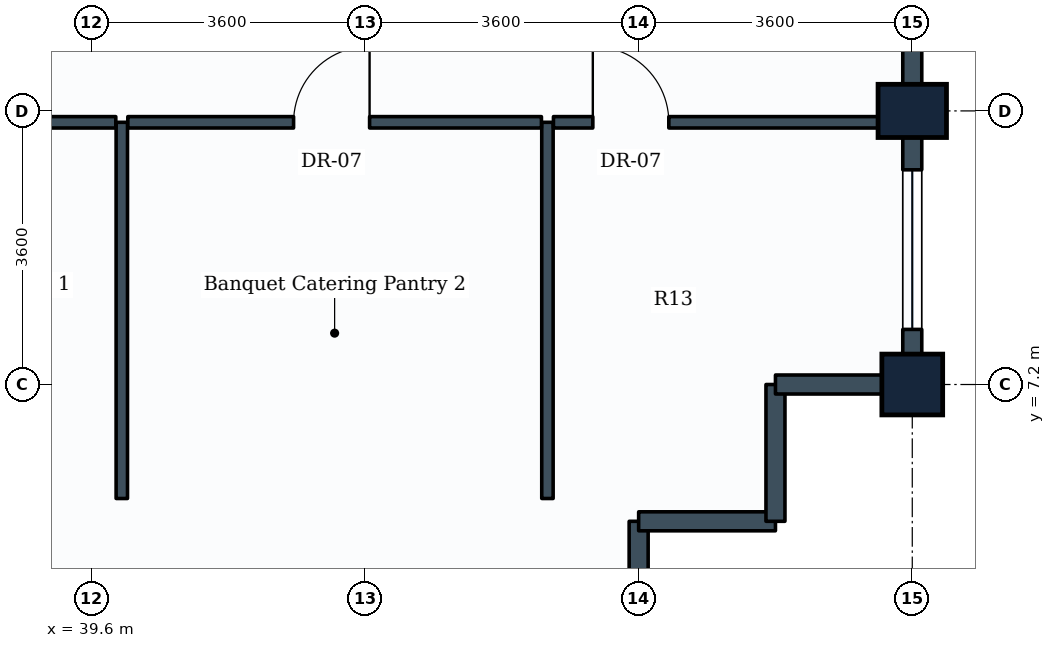
"""IFC4 building model, lengths in metres.
Left out: names, types, materials, properties, quantities, classifications, styles, units other than length and angle.
Written with IfcOpenShell. Run it as: python <this file> out.ifc"""

import sys

from ifc_helpers import new_model, si_unit, direction, frame, frame_2d, origin, origin_2d, place, context, subcontext, project, spatial, rectangle, extrude, element, fill, save


model = new_model("IFC4")
c1 = context("Model", 3, precision=1e-05, world=origin(), true_north=direction((0.0, 1.0)))
c2 = subcontext(c1, "Body", "Model", "MODEL_VIEW")
j1 = project(units=[si_unit("LENGTHUNIT", "METRE"), si_unit("PLANEANGLEUNIT", "RADIAN")], contexts=[c1])
p1 = place(None, origin())
s1 = spatial("IfcSite", under=j1, at=p1, CompositionType="ELEMENT")
p2 = place(p1, origin())
s2 = spatial("IfcBuilding", under=s1, at=p2, CompositionType="ELEMENT")
p3 = place(p2, frame((0.0, 0.0, 201.4)))
s3 = spatial("IfcBuildingStorey", under=s2, at=p3, CompositionType="ELEMENT", Elevation=201.4)
p4 = place(p3, frame((50.4, 7.2, 0.0), z_axis=(0.0, 0.0, 1.0), x_axis=(1.0, 0.0, 0.0)))
e1 = element("IfcColumn", 1, at=p4, inside=s3, PredefinedType="COLUMN", context=c2, shape_type="SweptSolid", body=[
    extrude(rectangle(XDim=0.8, YDim=0.8, at=origin_2d()), origin(), (0.0, 0.0, 1.0), 3.8),
])
p5 = place(p3, frame((50.4, 10.8, 0.0), z_axis=(0.0, 0.0, 1.0), x_axis=(0.0, 1.0, 0.0)))
e2 = element("IfcColumn", 2, at=p5, inside=s3, PredefinedType="COLUMN", context=c2, shape_type="SweptSolid", body=[
    extrude(rectangle(XDim=0.7, YDim=0.9, at=origin_2d()), origin(), (0.0, 0.0, 1.0), 3.8),
])
p6 = place(p3, frame((46.8, 5.4, 0.0), z_axis=(0.0, 0.0, 1.0), x_axis=(0.0, -1.0, 0.0)))
e3 = element("IfcWall", 3, at=p6, inside=s3, PredefinedType="STANDARD", context=c2, shape_type="SweptSolid", body=[
    extrude(rectangle(XDim=1.8, YDim=0.25, at=frame_2d((0.9, 0.0))), origin(), (0.0, 0.0, 1.0), 2.93),
])
for number, where, z_axis, x_axis in (
    (4, (48.6, 5.4, 0.0), (0.0, 0.0, 1.0), (-1.0, 0.0, 0.0)),
    (5, (48.6, 7.2, 0.0), (0.0, 0.0, 1.0), (0.0, -1.0, 0.0)),
):
    element("IfcWall", number, at=place(p3, frame(where, z_axis=z_axis, x_axis=x_axis)), inside=s3, PredefinedType="STANDARD", context=c2, shape_type="SweptSolid", body=[
        extrude(rectangle(XDim=1.8, YDim=0.25, at=frame_2d((0.9, 0.0))), origin(), (0.0, 0.0, 1.0), 3.535),
    ])
p7 = place(p3, frame((50.4, 7.2, 0.0), z_axis=(0.0, 0.0, 1.0), x_axis=(-1.0, 0.0, 0.0)))
e6 = element("IfcWall", 6, at=p7, inside=s3, PredefinedType="STANDARD", context=c2, shape_type="SweptSolid", body=[
    extrude(rectangle(XDim=1.8, YDim=0.25, at=frame_2d((0.9, 0.0))), origin(), (0.0, 0.0, 1.0), 2.93),
])
p8 = place(p3, frame((50.4, 10.8, 0.0), z_axis=(0.0, 0.0, 1.0), x_axis=(0.0, -1.0, 0.0)))
e7 = element("IfcWall", 7, at=p8, inside=s3, PredefinedType="STANDARD", context=c2, shape_type="SweptSolid", body=[
    extrude(rectangle(XDim=3.6, YDim=0.25, at=frame_2d((1.8, 0.0))), origin(), (0.0, 0.0, 1.0), 2.93),
])
p9 = place(p8, frame((0.775, 0.0, 0.85)))
e8 = element("IfcOpeningElement", 8, at=p9, cuts=e7, PredefinedType="OPENING", context=c2, shape_type="SweptSolid", body=[
    extrude(rectangle(XDim=2.1, YDim=1.35, at=frame_2d((1.05, 0.675))), frame((0.0, 0.135, 0.0), z_axis=(0.0, -1.0, 0.0), x_axis=(1.0, 0.0, 0.0)), (0.0, 0.0, 1.0), 0.27),
])
p10 = place(p3, frame((50.4, 14.4, 0.0), z_axis=(0.0, 0.0, 1.0), x_axis=(0.0, -1.0, 0.0)))
e9 = element("IfcWall", 9, at=p10, inside=s3, PredefinedType="STANDARD", context=c2, shape_type="SweptSolid", body=[
    extrude(rectangle(XDim=3.6, YDim=0.25, at=frame_2d((1.8, 0.0))), origin(), (0.0, 0.0, 1.0), 2.93),
])
p11 = place(p3, frame((40.0, 5.7, 0.0), z_axis=(0.0, 0.0, 1.0), x_axis=(0.0, 1.0, 0.0)))
e10 = element("IfcWall", 10, at=p11, inside=s3, PredefinedType="PARTITIONING", context=c2, shape_type="SweptSolid", body=[
    extrude(rectangle(XDim=4.95, YDim=0.15, at=frame_2d((2.475, 0.0))), origin(), (0.0, 0.0, 1.0), 3.2),
])
p12 = place(p3, frame((34.479, 10.65, 0.0), z_axis=(0.0, 0.0, 1.0), x_axis=(1.0, 0.0, 0.0)))
e11 = element("IfcWall", 11, at=p12, inside=s3, PredefinedType="PARTITIONING", context=c2, shape_type="SweptSolid", body=[
    extrude(rectangle(XDim=5.442, YDim=0.15, at=frame_2d((2.721, 0.0))), origin(), (0.0, 0.0, 1.0), 3.17),
])
p13 = place(p12, frame((2.181, 0.0, 0.0)))
e12 = element("IfcOpeningElement", 12, at=p13, cuts=e11, PredefinedType="OPENING", context=c2, shape_type="SweptSolid", body=[
    extrude(rectangle(XDim=1.0, YDim=2.1, at=frame_2d((0.5, 1.05))), frame((0.0, 0.085, 0.0), z_axis=(0.0, -1.0, 0.0), x_axis=(1.0, 0.0, 0.0)), (0.0, 0.0, 1.0), 0.17),
])
p14 = place(p3, frame((45.6, 5.7, 0.0), z_axis=(0.0, 0.0, 1.0), x_axis=(0.0, 1.0, 0.0)))
e13 = element("IfcWall", 13, at=p14, inside=s3, PredefinedType="PARTITIONING", context=c2, shape_type="SweptSolid", body=[
    extrude(rectangle(XDim=4.95, YDim=0.15, at=frame_2d((2.475, 0.0))), origin(), (0.0, 0.0, 1.0), 3.535),
])
p15 = place(p3, frame((40.079, 10.65, 0.0), z_axis=(0.0, 0.0, 1.0), x_axis=(1.0, 0.0, 0.0)))
e14 = element("IfcWall", 14, at=p15, inside=s3, PredefinedType="PARTITIONING", context=c2, shape_type="SweptSolid", body=[
    extrude(rectangle(XDim=5.442, YDim=0.15, at=frame_2d((2.721, 0.0))), origin(), (0.0, 0.0, 1.0), 3.17),
])
p16 = place(p15, frame((2.181, 0.0, 0.0)))
e15 = element("IfcOpeningElement", 15, at=p16, cuts=e14, PredefinedType="OPENING", context=c2, shape_type="SweptSolid", body=[
    extrude(rectangle(XDim=1.0, YDim=2.1, at=frame_2d((0.5, 1.05))), frame((0.0, 0.085, 0.0), z_axis=(0.0, -1.0, 0.0), x_axis=(1.0, 0.0, 0.0)), (0.0, 0.0, 1.0), 0.17),
])
p17 = place(p3, frame((45.679, 10.65, 0.0), z_axis=(0.0, 0.0, 1.0), x_axis=(1.0, 0.0, 0.0)))
e16 = element("IfcWall", 16, at=p17, inside=s3, PredefinedType="PARTITIONING", context=c2, shape_type="SweptSolid", body=[
    extrude(rectangle(XDim=4.592, YDim=0.15, at=frame_2d((2.296, 0.0))), origin(), (0.0, 0.0, 1.0), 2.93),
])
p18 = place(p17, frame((0.518, 0.0, 0.0)))
e17 = element("IfcOpeningElement", 17, at=p18, cuts=e16, PredefinedType="OPENING", context=c2, shape_type="SweptSolid", body=[
    extrude(rectangle(XDim=1.0, YDim=2.1, at=frame_2d((0.5, 1.05))), frame((0.0, 0.085, 0.0), z_axis=(0.0, -1.0, 0.0), x_axis=(1.0, 0.0, 0.0)), (0.0, 0.0, 1.0), 0.17),
])
p19 = place(p9, origin())
e18 = element("IfcWindow", 18, at=p19, inside=s3, PartitioningType="SINGLE_PANEL", PredefinedType="WINDOW", context=c2, shape_type="SweptSolid", body=[
    extrude(rectangle(XDim=2.1, YDim=1.35, at=frame_2d((1.05, 0.675))), frame((0.0, 0.03, 0.0), z_axis=(0.0, -1.0, 0.0), x_axis=(1.0, 0.0, 0.0)), (0.0, 0.0, 1.0), 0.06),
])
fill(e8, e18)
p20 = place(p16, origin())
e19 = element("IfcDoor", 19, at=p20, inside=s3, OperationType="SINGLE_SWING_RIGHT", PredefinedType="DOOR", context=c2, shape_type="SweptSolid", body=[
    extrude(rectangle(XDim=1.0, YDim=2.1, at=frame_2d((0.5, 1.05))), frame((0.0, 0.025, 0.0), z_axis=(0.0, -1.0, 0.0), x_axis=(1.0, 0.0, 0.0)), (0.0, 0.0, 1.0), 0.05),
])
fill(e15, e19)
p21 = place(p18, origin())
e20 = element("IfcDoor", 20, at=p21, inside=s3, OperationType="SINGLE_SWING_LEFT", PredefinedType="DOOR", context=c2, shape_type="SweptSolid", body=[
    extrude(rectangle(XDim=1.0, YDim=2.1, at=frame_2d((0.5, 1.05))), frame((0.0, 0.025, 0.0), z_axis=(0.0, -1.0, 0.0), x_axis=(1.0, 0.0, 0.0)), (0.0, 0.0, 1.0), 0.05),
])
fill(e17, e20)
save(model, sys.argv[1])
